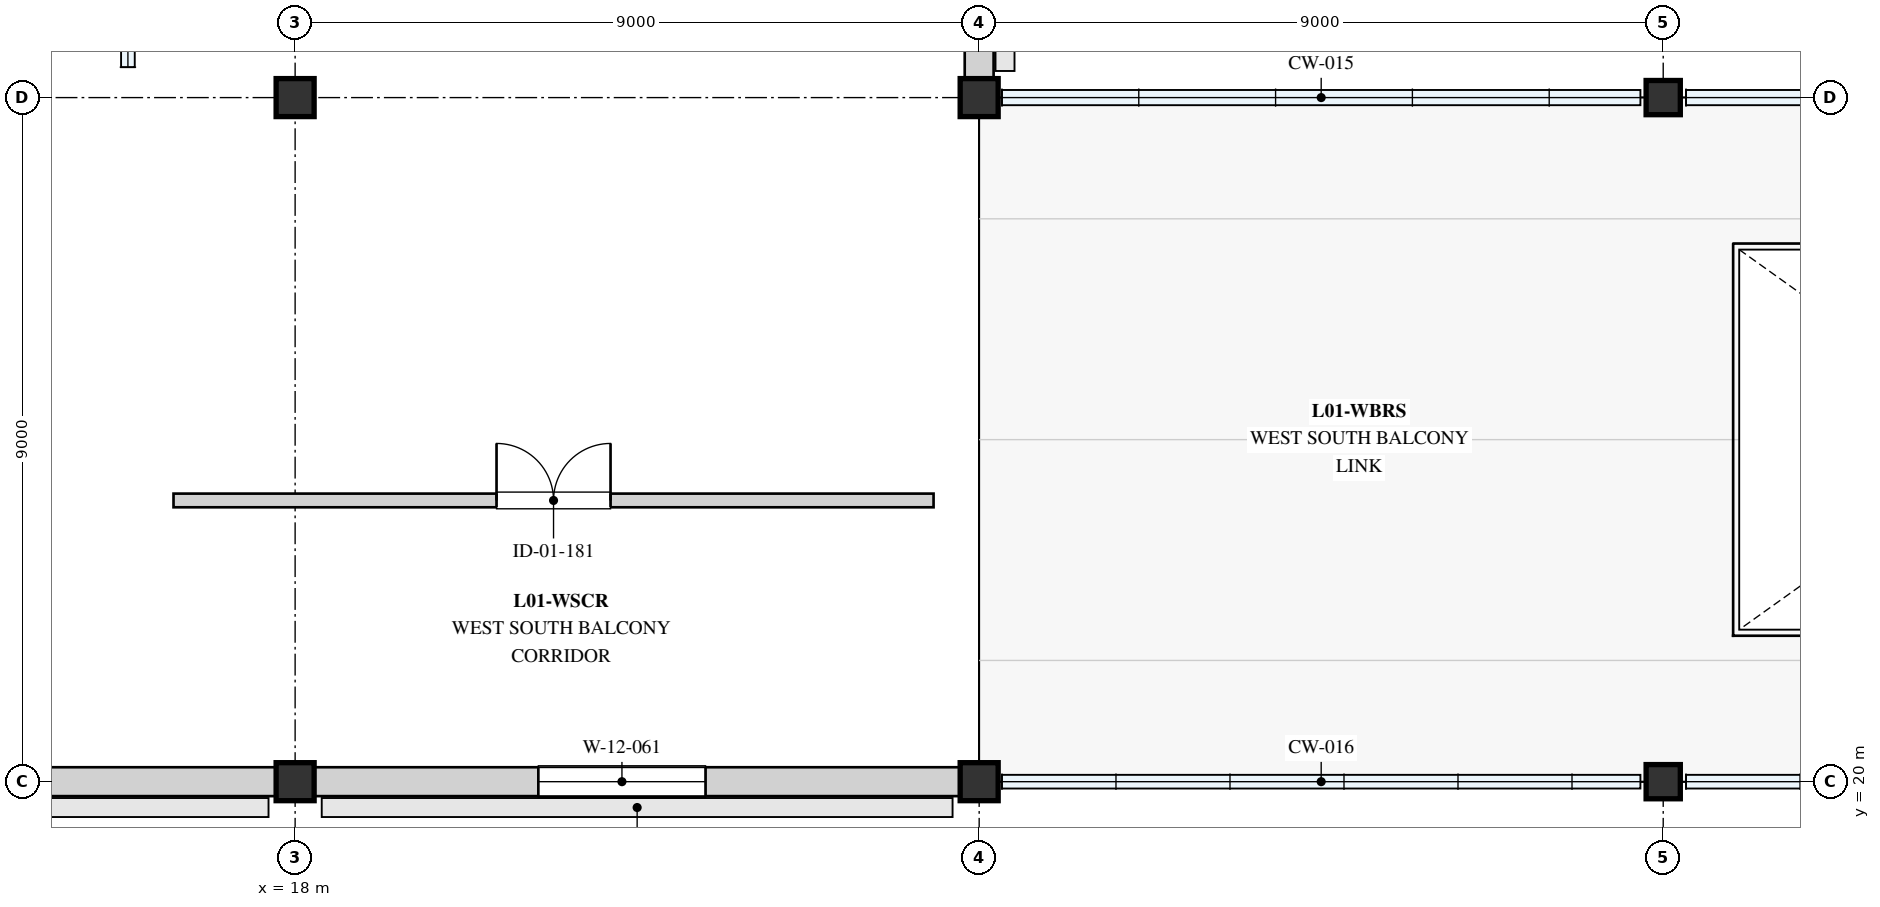
"""IFC4 building model, lengths in metres.
Left out: names, types, materials, properties, quantities, classifications, styles, units other than length and angle.
Written with IfcOpenShell. Run it as: python <this file> out.ifc"""

import sys

from ifc_helpers import new_model, si_unit, direction, frame, frame_2d, origin, origin_2d, place, context, subcontext, project, spatial, rectangle, extrude, element, fill, save


model = new_model("IFC4")
c1 = context("Model", 3, precision=1e-05, world=origin(), true_north=direction((0.0, 1.0)))
c2 = subcontext(c1, "Body", "Model", "MODEL_VIEW")
j1 = project(units=[si_unit("LENGTHUNIT", "METRE"), si_unit("PLANEANGLEUNIT", "RADIAN")], contexts=[c1])
p1 = place(None, origin())
s1 = spatial("IfcSite", under=j1, at=p1, CompositionType="ELEMENT")
p2 = place(p1, origin())
s2 = spatial("IfcBuilding", under=s1, at=p2, CompositionType="ELEMENT")
p3 = place(p2, frame((0.0, 0.0, 4.5)))
s3 = spatial("IfcBuildingStorey", under=s2, at=p3, CompositionType="ELEMENT", Elevation=4.5)
for number, where, z_axis, x_axis in (
    (1, (18.0, 20.0, 0.0), (0.0, 0.0, 1.0), (1.0, 0.0, 0.0)),
    (2, (18.0, 29.0, 0.0), (0.0, 0.0, 1.0), (1.0, 0.0, 0.0)),
):
    element("IfcColumn", number, at=place(p3, frame(where, z_axis=z_axis, x_axis=x_axis)), inside=s3, PredefinedType="COLUMN", context=c2, shape_type="SweptSolid", body=[
        extrude(rectangle(XDim=0.5, YDim=0.5, at=origin_2d()), origin(), (0.0, 0.0, 1.0), 3.9),
    ])
for number, where, z_axis, x_axis in (
    (3, (27.0, 20.0, 0.0), (0.0, 0.0, 1.0), (1.0, 0.0, 0.0)),
    (4, (27.0, 29.0, 0.0), (0.0, 0.0, 1.0), (1.0, 0.0, 0.0)),
):
    element("IfcColumn", number, at=place(p3, frame(where, z_axis=z_axis, x_axis=x_axis)), inside=s3, PredefinedType="COLUMN", context=c2, shape_type="SweptSolid", body=[
        extrude(rectangle(XDim=0.5, YDim=0.5, at=origin_2d()), origin(), (0.0, 0.0, 1.0), 3.48),
    ])
p4 = place(p3, frame((36.0, 20.0, 0.0), z_axis=(0.0, 0.0, 1.0), x_axis=(1.0, 0.0, 0.0)))
e5 = element("IfcColumn", 5, at=p4, inside=s3, PredefinedType="COLUMN", context=c2, shape_type="SweptSolid", body=[
    extrude(rectangle(XDim=0.45, YDim=0.45, at=origin_2d()), origin(), (0.0, 0.0, 1.0), 3.59),
])
p5 = place(p3, frame((36.0, 29.0, 0.0), z_axis=(0.0, 0.0, 1.0), x_axis=(1.0, 0.0, 0.0)))
e6 = element("IfcColumn", 6, at=p5, inside=s3, PredefinedType="COLUMN", context=c2, shape_type="SweptSolid", body=[
    extrude(rectangle(XDim=0.45, YDim=0.45, at=origin_2d()), origin(), (0.0, 0.0, 1.0), 5.59),
])
p6 = place(p3, frame((27.0, 29.0, 0.0), z_axis=(0.0, 0.0, 1.0), x_axis=(0.0, 1.0, 0.0)))
e7 = element("IfcWall", 7, at=p6, inside=s3, PredefinedType="STANDARD", context=c2, shape_type="SweptSolid", body=[
    extrude(rectangle(XDim=9.0, YDim=0.38, at=frame_2d((4.5, 0.0))), origin(), (0.0, 0.0, 1.0), 2.76),
])
p7 = place(p6, frame((2.1, 0.0, 0.47)))
e8 = element("IfcOpeningElement", 8, at=p7, cuts=e7, PredefinedType="OPENING", context=c2, shape_type="SweptSolid", body=[
    extrude(rectangle(XDim=1.6, YDim=2.1, at=frame_2d((0.8, 1.05))), frame((0.0, 0.2, 0.0), z_axis=(0.0, -1.0, 0.0), x_axis=(1.0, 0.0, 0.0)), (0.0, 0.0, 1.0), 0.4),
])
p8 = place(p6, frame((5.3, 0.0, 0.47)))
e9 = element("IfcOpeningElement", 9, at=p8, cuts=e7, PredefinedType="OPENING", context=c2, shape_type="SweptSolid", body=[
    extrude(rectangle(XDim=1.6, YDim=2.1, at=frame_2d((0.8, 1.05))), frame((0.0, 0.2, 0.0), z_axis=(0.0, -1.0, 0.0), x_axis=(1.0, 0.0, 0.0)), (0.0, 0.0, 1.0), 0.4),
])
p9 = place(p3, frame((9.0, 20.0, 0.0), z_axis=(0.0, 0.0, 1.0), x_axis=(1.0, 0.0, 0.0)))
e10 = element("IfcWall", 10, at=p9, inside=s3, PredefinedType="STANDARD", context=c2, shape_type="SweptSolid", body=[
    extrude(rectangle(XDim=9.0, YDim=0.38, at=frame_2d((4.5, 0.0))), origin(), (0.0, 0.0, 1.0), 2.76),
])
p10 = place(p9, frame((3.2, 0.0, 0.47)))
e11 = element("IfcOpeningElement", 11, at=p10, cuts=e10, PredefinedType="OPENING", context=c2, shape_type="SweptSolid", body=[
    extrude(rectangle(XDim=2.2, YDim=2.1, at=frame_2d((1.1, 1.05))), frame((0.0, 0.2, 0.0), z_axis=(0.0, -1.0, 0.0), x_axis=(1.0, 0.0, 0.0)), (0.0, 0.0, 1.0), 0.4),
])
p11 = place(p3, frame((18.0, 20.0, 0.0), z_axis=(0.0, 0.0, 1.0), x_axis=(1.0, 0.0, 0.0)))
e12 = element("IfcWall", 12, at=p11, inside=s3, PredefinedType="STANDARD", context=c2, shape_type="SweptSolid", body=[
    extrude(rectangle(XDim=9.0, YDim=0.38, at=frame_2d((4.5, 0.0))), origin(), (0.0, 0.0, 1.0), 2.76),
])
p12 = place(p11, frame((3.2, 0.0, 0.47)))
e13 = element("IfcOpeningElement", 13, at=p12, cuts=e12, PredefinedType="OPENING", context=c2, shape_type="SweptSolid", body=[
    extrude(rectangle(XDim=2.2, YDim=2.1, at=frame_2d((1.1, 1.05))), frame((0.0, 0.2, 0.0), z_axis=(0.0, -1.0, 0.0), x_axis=(1.0, 0.0, 0.0)), (0.0, 0.0, 1.0), 0.4),
])
p13 = place(p3, frame((16.4, 23.7, 0.0), z_axis=(0.0, 0.0, 1.0), x_axis=(1.0, 0.0, 0.0)))
e14 = element("IfcWall", 14, at=p13, inside=s3, PredefinedType="STANDARD", context=c2, shape_type="SweptSolid", body=[
    extrude(rectangle(XDim=10.0, YDim=0.18, at=frame_2d((5.0, 0.0))), origin(), (0.0, 0.0, 1.0), 2.65),
])
p14 = place(p13, frame((4.25, 0.0, 0.0)))
e15 = element("IfcOpeningElement", 15, at=p14, cuts=e14, PredefinedType="OPENING", context=c2, shape_type="SweptSolid", body=[
    extrude(rectangle(XDim=1.5, YDim=2.25, at=frame_2d((0.75, 1.125))), frame((0.0, 0.1, 0.0), z_axis=(0.0, -1.0, 0.0), x_axis=(1.0, 0.0, 0.0)), (0.0, 0.0, 1.0), 0.2),
])
p15 = place(p12, origin())
e16 = element("IfcWindow", 16, at=p15, inside=s3, PartitioningType="SINGLE_PANEL", PredefinedType="WINDOW", context=c2, shape_type="SweptSolid", body=[
    extrude(rectangle(XDim=2.2, YDim=2.1, at=frame_2d((1.1, 1.05))), frame((0.0, 0.03, 0.0), z_axis=(0.0, -1.0, 0.0), x_axis=(1.0, 0.0, 0.0)), (0.0, 0.0, 1.0), 0.06),
])
fill(e13, e16)
p16 = place(p14, origin())
e17 = element("IfcDoor", 17, at=p16, inside=s3, OperationType="DOUBLE_DOOR_SINGLE_SWING", PredefinedType="DOOR", context=c2, shape_type="SweptSolid", body=[
    extrude(rectangle(XDim=1.5, YDim=2.25, at=frame_2d((0.75, 1.125))), frame((0.0, 0.025, 0.0), z_axis=(0.0, -1.0, 0.0), x_axis=(1.0, 0.0, 0.0)), (0.0, 0.0, 1.0), 0.05),
])
fill(e15, e17)
save(model, sys.argv[1])
